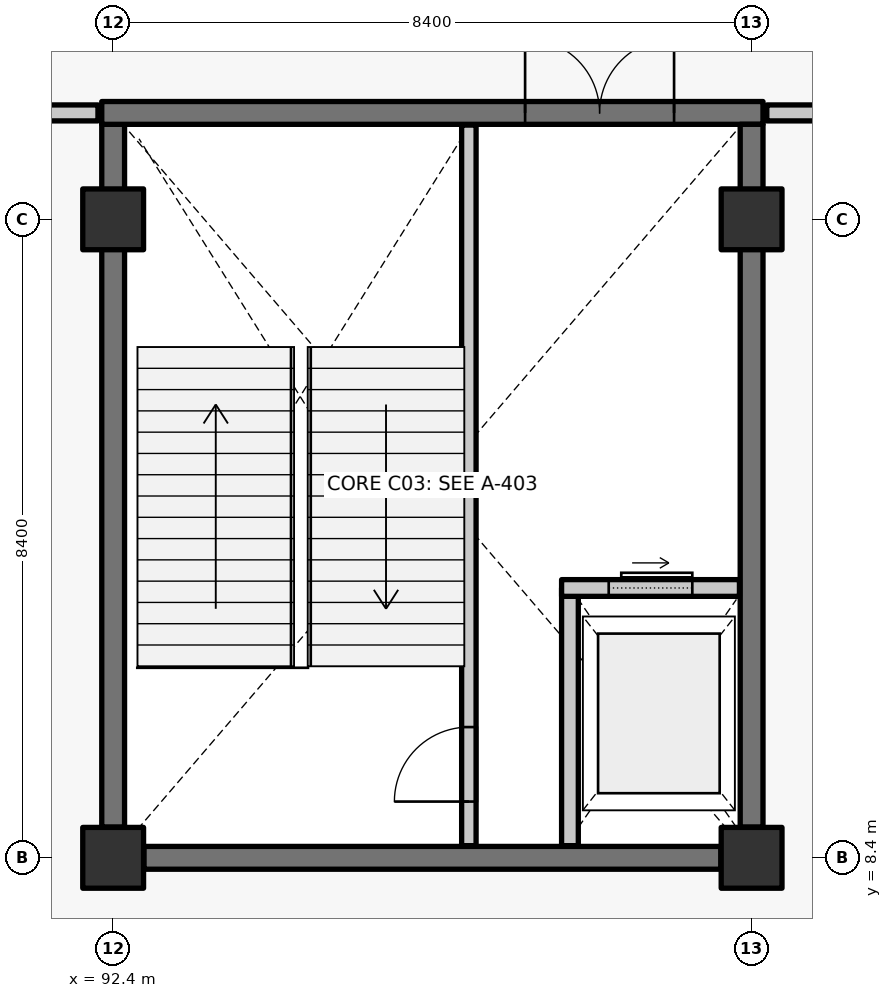
"""IFC4 building model, lengths in metres.
Left out: names, types, materials, properties, quantities, classifications, styles, units other than length and angle.
Written with IfcOpenShell. Run it as: python <this file> out.ifc"""

import sys

from ifc_helpers import new_model, si_unit, direction, frame, frame_2d, origin, origin_2d, place, context, subcontext, project, spatial, rectangle, extrude, element, fill, save


model = new_model("IFC4")
c1 = context("Model", 3, precision=1e-05, world=origin(), true_north=direction((0.0, 1.0)))
c2 = subcontext(c1, "Body", "Model", "MODEL_VIEW")
j1 = project(units=[si_unit("LENGTHUNIT", "METRE"), si_unit("PLANEANGLEUNIT", "RADIAN")], contexts=[c1])
p1 = place(None, origin())
s1 = spatial("IfcSite", under=j1, at=p1, CompositionType="ELEMENT")
p2 = place(p1, origin())
s2 = spatial("IfcBuilding", under=s1, at=p2, CompositionType="ELEMENT")
p3 = place(p2, frame((0.0, 0.0, 6.0)))
s3 = spatial("IfcBuildingStorey", under=s2, at=p3, CompositionType="ELEMENT", Elevation=6.0)
for number, where, z_axis, x_axis in (
    (1, (92.4, 8.4, 0.0), (0.0, 0.0, 1.0), (1.0, 0.0, 0.0)),
    (2, (92.4, 16.8, 0.0), (0.0, 0.0, 1.0), (1.0, 0.0, 0.0)),
    (3, (100.8, 8.4, 0.0), (0.0, 0.0, 1.0), (1.0, 0.0, 0.0)),
    (4, (100.8, 16.8, 0.0), (0.0, 0.0, 1.0), (1.0, 0.0, 0.0)),
):
    element("IfcColumn", number, at=place(p3, frame(where, z_axis=z_axis, x_axis=x_axis)), inside=s3, PredefinedType="COLUMN", context=c2, shape_type="SweptSolid", body=[
        extrude(rectangle(XDim=0.8, YDim=0.8, at=origin_2d()), origin(), (0.0, 0.0, 1.0), 5.4),
    ])
p4 = place(p3, frame((100.395, 8.4, 0.0), z_axis=(0.0, 0.0, 1.0), x_axis=(-1.0, 0.0, 0.0)))
e5 = element("IfcWall", 5, at=p4, inside=s3, PredefinedType="SHEAR", context=c2, shape_type="SweptSolid", body=[
    extrude(rectangle(XDim=7.59, YDim=0.3, at=frame_2d((3.795, 0.0))), origin(), (0.0, 0.0, 1.0), 5.12),
])
p5 = place(p3, frame((92.4, 8.805, 0.0), z_axis=(0.0, 0.0, 1.0), x_axis=(0.0, 1.0, 0.0)))
e6 = element("IfcWall", 6, at=p5, inside=s3, PredefinedType="SHEAR", context=c2, shape_type="SweptSolid", body=[
    extrude(rectangle(XDim=9.245, YDim=0.3, at=frame_2d((4.623, 0.0))), origin(), (0.0, 0.0, 1.0), 5.12),
])
p6 = place(p3, frame((92.25, 18.2, 0.0), z_axis=(0.0, 0.0, 1.0), x_axis=(1.0, 0.0, 0.0)))
e7 = element("IfcWall", 7, at=p6, inside=s3, PredefinedType="SHEAR", context=c2, shape_type="SweptSolid", body=[
    extrude(rectangle(XDim=8.7, YDim=0.3, at=frame_2d((4.35, 0.0))), origin(), (0.0, 0.0, 1.0), 5.12),
])
p7 = place(p6, frame((5.57, 0.0, 0.0)))
e8 = element("IfcOpeningElement", 8, at=p7, cuts=e7, PredefinedType="OPENING", context=c2, shape_type="SweptSolid", body=[
    extrude(rectangle(XDim=1.96, YDim=2.2, at=frame_2d((0.98, 1.1))), frame((0.0, 0.16, 0.0), z_axis=(0.0, -1.0, 0.0), x_axis=(1.0, 0.0, 0.0)), (0.0, 0.0, 1.0), 0.32),
])
p8 = place(p3, frame((100.8, 18.05, 0.0), z_axis=(0.0, 0.0, 1.0), x_axis=(0.0, -1.0, 0.0)))
e9 = element("IfcWall", 9, at=p8, inside=s3, PredefinedType="SHEAR", context=c2, shape_type="SweptSolid", body=[
    extrude(rectangle(XDim=9.245, YDim=0.3, at=frame_2d((4.623, 0.0))), origin(), (0.0, 0.0, 1.0), 5.12),
])
p9 = place(p3, frame((97.08, 8.56, 0.0), z_axis=(0.0, 0.0, 1.0), x_axis=(0.0, 1.0, 0.0)))
e10 = element("IfcWall", 10, at=p9, inside=s3, PredefinedType="SOLIDWALL", context=c2, shape_type="SweptSolid", body=[
    extrude(rectangle(XDim=9.48, YDim=0.19, at=frame_2d((4.74, 0.0))), origin(), (0.0, 0.0, 1.0), 5.12),
])
p10 = place(p9, frame((0.58, 0.0, 0.0)))
e11 = element("IfcOpeningElement", 11, at=p10, cuts=e10, PredefinedType="OPENING", context=c2, shape_type="SweptSolid", body=[
    extrude(rectangle(XDim=0.98, YDim=2.15, at=frame_2d((0.49, 1.075))), frame((0.0, 0.105, 0.0), z_axis=(0.0, -1.0, 0.0), x_axis=(1.0, 0.0, 0.0)), (0.0, 0.0, 1.0), 0.21),
])
p11 = place(p3, frame((98.41, 8.56, 0.0), z_axis=(0.0, 0.0, 1.0), x_axis=(0.0, 1.0, 0.0)))
e12 = element("IfcWall", 12, at=p11, inside=s3, PredefinedType="SOLIDWALL", context=c2, shape_type="SweptSolid", body=[
    extrude(rectangle(XDim=3.39, YDim=0.22, at=frame_2d((1.695, 0.0))), origin(), (0.0, 0.0, 1.0), 5.12),
])
p12 = place(p3, frame((98.3, 11.95, 0.0), z_axis=(0.0, 0.0, 1.0), x_axis=(1.0, 0.0, 0.0)))
e13 = element("IfcWall", 13, at=p12, inside=s3, PredefinedType="SOLIDWALL", context=c2, shape_type="SweptSolid", body=[
    extrude(rectangle(XDim=2.34, YDim=0.22, at=frame_2d((1.17, 0.0))), origin(), (0.0, 0.0, 1.0), 5.12),
])
p13 = place(p12, frame((0.62, 0.0, 0.0)))
e14 = element("IfcOpeningElement", 14, at=p13, cuts=e13, PredefinedType="OPENING", context=c2, shape_type="SweptSolid", body=[
    extrude(rectangle(XDim=1.1, YDim=2.2, at=frame_2d((0.55, 1.1))), frame((0.0, 0.12, 0.0), z_axis=(0.0, -1.0, 0.0), x_axis=(1.0, 0.0, 0.0)), (0.0, 0.0, 1.0), 0.24),
])
p14 = place(p3, frame((75.8, 18.2, 0.0), z_axis=(0.0, 0.0, 1.0), x_axis=(1.0, 0.0, 0.0)))
e15 = element("IfcWall", 15, at=p14, inside=s3, PredefinedType="PARTITIONING", context=c2, shape_type="SweptSolid", body=[
    extrude(rectangle(XDim=16.4, YDim=0.21, at=frame_2d((8.2, 0.0))), origin(), (0.0, 0.0, 1.0), 5.12),
])
p15 = place(p14, frame((3.5, 0.0, 0.0)))
e16 = element("IfcOpeningElement", 16, at=p15, cuts=e15, PredefinedType="OPENING", context=c2, shape_type="SweptSolid", body=[
    extrude(rectangle(XDim=1.0, YDim=2.15, at=frame_2d((0.5, 1.075))), frame((0.0, 0.115, 0.0), z_axis=(0.0, -1.0, 0.0), x_axis=(1.0, 0.0, 0.0)), (0.0, 0.0, 1.0), 0.23),
])
p16 = place(p14, frame((11.9, 0.0, 0.0)))
e17 = element("IfcOpeningElement", 17, at=p16, cuts=e15, PredefinedType="OPENING", context=c2, shape_type="SweptSolid", body=[
    extrude(rectangle(XDim=1.0, YDim=2.15, at=frame_2d((0.5, 1.075))), frame((0.0, 0.115, 0.0), z_axis=(0.0, -1.0, 0.0), x_axis=(1.0, 0.0, 0.0)), (0.0, 0.0, 1.0), 0.23),
])
p17 = place(p3, frame((101.0, 18.2, 0.0), z_axis=(0.0, 0.0, 1.0), x_axis=(1.0, 0.0, 0.0)))
e18 = element("IfcWall", 18, at=p17, inside=s3, PredefinedType="PARTITIONING", context=c2, shape_type="SweptSolid", body=[
    extrude(rectangle(XDim=16.4, YDim=0.21, at=frame_2d((8.2, 0.0))), origin(), (0.0, 0.0, 1.0), 5.12),
])
p18 = place(p17, frame((3.3, 0.0, 0.0)))
e19 = element("IfcOpeningElement", 19, at=p18, cuts=e18, PredefinedType="OPENING", context=c2, shape_type="SweptSolid", body=[
    extrude(rectangle(XDim=1.4, YDim=2.2, at=frame_2d((0.7, 1.1))), frame((0.0, 0.115, 0.0), z_axis=(0.0, -1.0, 0.0), x_axis=(1.0, 0.0, 0.0)), (0.0, 0.0, 1.0), 0.23),
])
p19 = place(p17, frame((11.7, 0.0, 0.0)))
e20 = element("IfcOpeningElement", 20, at=p19, cuts=e18, PredefinedType="OPENING", context=c2, shape_type="SweptSolid", body=[
    extrude(rectangle(XDim=1.4, YDim=2.2, at=frame_2d((0.7, 1.1))), frame((0.0, 0.115, 0.0), z_axis=(0.0, -1.0, 0.0), x_axis=(1.0, 0.0, 0.0)), (0.0, 0.0, 1.0), 0.23),
])
p20 = place(p10, origin())
e21 = element("IfcDoor", 21, at=p20, inside=s3, OperationType="SINGLE_SWING_LEFT", PredefinedType="DOOR", context=c2, shape_type="SweptSolid", body=[
    extrude(rectangle(XDim=0.98, YDim=2.15, at=frame_2d((0.49, 1.075))), frame((0.0, 0.025, 0.0), z_axis=(0.0, -1.0, 0.0), x_axis=(1.0, 0.0, 0.0)), (0.0, 0.0, 1.0), 0.05),
])
fill(e11, e21)
p21 = place(p7, origin())
e22 = element("IfcDoor", 22, at=p21, inside=s3, OperationType="DOUBLE_DOOR_SINGLE_SWING", PredefinedType="DOOR", context=c2, shape_type="SweptSolid", body=[
    extrude(rectangle(XDim=1.96, YDim=2.2, at=frame_2d((0.98, 1.1))), frame((0.0, 0.025, 0.0), z_axis=(0.0, -1.0, 0.0), x_axis=(1.0, 0.0, 0.0)), (0.0, 0.0, 1.0), 0.05),
])
fill(e8, e22)
p22 = place(p13, origin())
e23 = element("IfcDoor", 23, at=p22, inside=s3, OperationType="SLIDING_TO_RIGHT", PredefinedType="DOOR", context=c2, shape_type="SweptSolid", body=[
    extrude(rectangle(XDim=1.1, YDim=2.2, at=frame_2d((0.55, 1.1))), frame((0.0, 0.025, 0.0), z_axis=(0.0, -1.0, 0.0), x_axis=(1.0, 0.0, 0.0)), (0.0, 0.0, 1.0), 0.05),
])
fill(e14, e23)
save(model, sys.argv[1])
